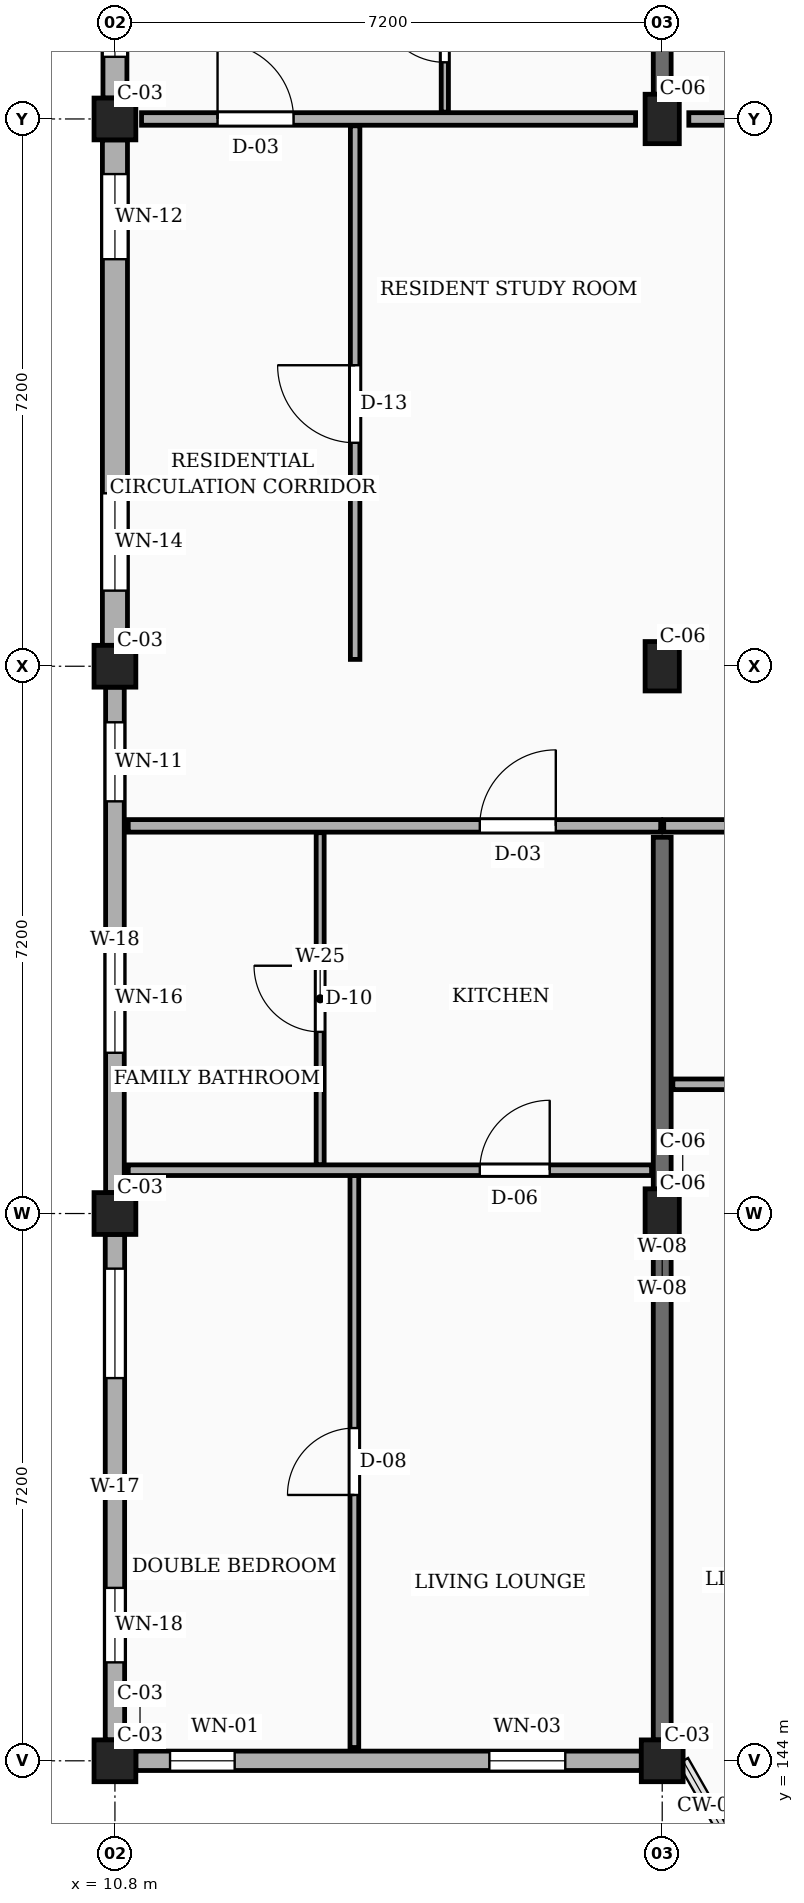
"""IFC4 building model, lengths in metres.
Left out: names, types, materials, properties, quantities, classifications, styles, units other than length and angle.
Written with IfcOpenShell. Run it as: python <this file> out.ifc"""

import sys

from ifc_helpers import new_model, si_unit, direction, frame, frame_2d, origin, origin_2d, place, context, subcontext, project, spatial, rectangle, extrude, element, fill, save


model = new_model("IFC4")
c1 = context("Model", 3, precision=1e-05, world=origin(), true_north=direction((0.0, 1.0)))
c2 = subcontext(c1, "Body", "Model", "MODEL_VIEW")
j1 = project(units=[si_unit("LENGTHUNIT", "METRE"), si_unit("PLANEANGLEUNIT", "RADIAN")], contexts=[c1])
p1 = place(None, origin())
s1 = spatial("IfcSite", under=j1, at=p1, CompositionType="ELEMENT")
p2 = place(p1, origin())
s2 = spatial("IfcBuilding", under=s1, at=p2, CompositionType="ELEMENT")
p3 = place(p2, frame((0.0, 0.0, 17.1)))
s3 = spatial("IfcBuildingStorey", under=s2, at=p3, CompositionType="ELEMENT", Elevation=17.1)
for number, where, z_axis, x_axis in (
    (1, (10.8, 144.0, 0.0), (0.0, 0.0, 1.0), (1.0, 0.0, 0.0)),
    (2, (10.8, 151.2, 0.0), (0.0, 0.0, 1.0), (1.0, 0.0, 0.0)),
    (3, (10.8, 158.4, 0.0), (0.0, 0.0, 1.0), (1.0, 0.0, 0.0)),
    (4, (10.8, 165.6, 0.0), (0.0, 0.0, 1.0), (1.0, 0.0, 0.0)),
    (5, (18.0, 144.0, 0.0), (0.0, 0.0, 1.0), (1.0, 0.0, 0.0)),
):
    element("IfcColumn", number, at=place(p3, frame(where, z_axis=z_axis, x_axis=x_axis)), inside=s3, PredefinedType="COLUMN", context=c2, shape_type="SweptSolid", body=[
        extrude(rectangle(XDim=0.55, YDim=0.55, at=origin_2d()), origin(), (0.0, 0.0, 1.0), 3.15),
    ])
for number, where, z_axis, x_axis in (
    (6, (18.0, 151.2, 0.0), (0.0, 0.0, 1.0), (1.0, 0.0, 0.0)),
    (7, (18.0, 158.4, 0.0), (0.0, 0.0, 1.0), (1.0, 0.0, 0.0)),
    (8, (18.0, 165.6, 0.0), (0.0, 0.0, 1.0), (1.0, 0.0, 0.0)),
):
    element("IfcColumn", number, at=place(p3, frame(where, z_axis=z_axis, x_axis=x_axis)), inside=s3, PredefinedType="COLUMN", context=c2, shape_type="SweptSolid", body=[
        extrude(rectangle(XDim=0.45, YDim=0.65, at=origin_2d()), origin(), (0.0, 0.0, 1.0), 3.15),
    ])
p4 = place(p3, frame((18.0, 144.275, 0.0), z_axis=(0.0, 0.0, 1.0), x_axis=(0.0, 1.0, 0.0)))
e9 = element("IfcWall", 9, at=p4, inside=s3, PredefinedType="SOLIDWALL", context=c2, shape_type="SweptSolid", body=[
    extrude(rectangle(XDim=11.875, YDim=0.235, at=frame_2d((5.938, 0.0))), origin(), (0.0, 0.0, 1.0), 2.185),
])
p5 = place(p3, frame((18.0, 165.925, 0.0), z_axis=(0.0, 0.0, 1.0), x_axis=(0.0, 1.0, 0.0)))
e10 = element("IfcWall", 10, at=p5, inside=s3, PredefinedType="SOLIDWALL", context=c2, shape_type="SweptSolid", body=[
    extrude(rectangle(XDim=6.6, YDim=0.235, at=frame_2d((3.3, 0.0))), origin(), (0.0, 0.0, 1.0), 2.185),
])
p6 = place(p3, frame((11.075, 144.0, 0.0), z_axis=(0.0, 0.0, 1.0), x_axis=(1.0, 0.0, 0.0)))
e11 = element("IfcWall", 11, at=p6, inside=s3, PredefinedType="SOLIDWALL", context=c2, shape_type="SweptSolid", body=[
    extrude(rectangle(XDim=6.65, YDim=0.255, at=frame_2d((3.325, 0.0))), origin(), (0.0, 0.0, 1.0), 2.455),
])
p7 = place(p6, frame((0.45, 0.0, 0.78)))
e12 = element("IfcOpeningElement", 12, at=p7, cuts=e11, PredefinedType="OPENING", context=c2, shape_type="SweptSolid", body=[
    extrude(rectangle(XDim=0.85, YDim=1.15, at=frame_2d((0.425, 0.575))), frame((0.0, 0.137, 0.0), z_axis=(0.0, -1.0, 0.0), x_axis=(1.0, 0.0, 0.0)), (0.0, 0.0, 1.0), 0.275),
])
p8 = place(p6, frame((4.65, 0.0, 0.78)))
e13 = element("IfcOpeningElement", 13, at=p8, cuts=e11, PredefinedType="OPENING", context=c2, shape_type="SweptSolid", body=[
    extrude(rectangle(XDim=1.0, YDim=1.15, at=frame_2d((0.5, 0.575))), frame((0.0, 0.137, 0.0), z_axis=(0.0, -1.0, 0.0), x_axis=(1.0, 0.0, 0.0)), (0.0, 0.0, 1.0), 0.275),
])
p9 = place(p3, frame((10.8, 172.525, 0.0), z_axis=(0.0, 0.0, 1.0), x_axis=(0.0, -1.0, 0.0)))
e14 = element("IfcWall", 14, at=p9, inside=s3, PredefinedType="SOLIDWALL", context=c2, shape_type="SweptSolid", body=[
    extrude(rectangle(XDim=6.65, YDim=0.315, at=frame_2d((3.325, 0.0))), origin(), (0.0, 0.0, 1.0), 2.455),
])
p10 = place(p9, frame((1.883, 0.0, 0.78)))
e15 = element("IfcOpeningElement", 15, at=p10, cuts=e14, PredefinedType="OPENING", context=c2, shape_type="SweptSolid", body=[
    extrude(rectangle(XDim=0.96, YDim=1.26, at=frame_2d((0.48, 0.63))), frame((0.0, 0.167, 0.0), z_axis=(0.0, -1.0, 0.0), x_axis=(1.0, 0.0, 0.0)), (0.0, 0.0, 1.0), 0.335),
])
p11 = place(p9, frame((4.988, 0.0, 0.78)))
e16 = element("IfcOpeningElement", 16, at=p11, cuts=e14, PredefinedType="OPENING", context=c2, shape_type="SweptSolid", body=[
    extrude(rectangle(XDim=1.12, YDim=1.26, at=frame_2d((0.56, 0.63))), frame((0.0, 0.167, 0.0), z_axis=(0.0, -1.0, 0.0), x_axis=(1.0, 0.0, 0.0)), (0.0, 0.0, 1.0), 0.335),
])
p12 = place(p3, frame((10.8, 165.325, 0.0), z_axis=(0.0, 0.0, 1.0), x_axis=(0.0, -1.0, 0.0)))
e17 = element("IfcWall", 17, at=p12, inside=s3, PredefinedType="SOLIDWALL", context=c2, shape_type="SweptSolid", body=[
    extrude(rectangle(XDim=6.65, YDim=0.33, at=frame_2d((3.325, 0.0))), origin(), (0.0, 0.0, 1.0), 2.455),
])
p13 = place(p12, frame((0.45, 0.0, 0.78)))
e18 = element("IfcOpeningElement", 18, at=p13, cuts=e17, PredefinedType="OPENING", context=c2, shape_type="SweptSolid", body=[
    extrude(rectangle(XDim=1.12, YDim=1.26, at=frame_2d((0.56, 0.63))), frame((0.0, 0.175, 0.0), z_axis=(0.0, -1.0, 0.0), x_axis=(1.0, 0.0, 0.0)), (0.0, 0.0, 1.0), 0.35),
])
p14 = place(p12, frame((4.65, 0.0, 0.78)))
e19 = element("IfcOpeningElement", 19, at=p14, cuts=e17, PredefinedType="OPENING", context=c2, shape_type="SweptSolid", body=[
    extrude(rectangle(XDim=1.28, YDim=1.26, at=frame_2d((0.64, 0.63))), frame((0.0, 0.175, 0.0), z_axis=(0.0, -1.0, 0.0), x_axis=(1.0, 0.0, 0.0)), (0.0, 0.0, 1.0), 0.35),
])
p15 = place(p3, frame((10.8, 158.125, 0.0), z_axis=(0.0, 0.0, 1.0), x_axis=(0.0, -1.0, 0.0)))
e20 = element("IfcWall", 20, at=p15, inside=s3, PredefinedType="SOLIDWALL", context=c2, shape_type="SweptSolid", body=[
    extrude(rectangle(XDim=6.65, YDim=0.245, at=frame_2d((3.325, 0.0))), origin(), (0.0, 0.0, 1.0), 2.455),
])
p16 = place(p15, frame((0.462, 0.0, 0.78)))
e21 = element("IfcOpeningElement", 21, at=p16, cuts=e20, PredefinedType="OPENING", context=c2, shape_type="SweptSolid", body=[
    extrude(rectangle(XDim=1.04, YDim=1.26, at=frame_2d((0.52, 0.63))), frame((0.0, 0.133, 0.0), z_axis=(0.0, -1.0, 0.0), x_axis=(1.0, 0.0, 0.0)), (0.0, 0.0, 1.0), 0.265),
])
p17 = place(p15, frame((3.37, 0.0, 0.78)))
e22 = element("IfcOpeningElement", 22, at=p17, cuts=e20, PredefinedType="OPENING", context=c2, shape_type="SweptSolid", body=[
    extrude(rectangle(XDim=1.44, YDim=1.26, at=frame_2d((0.72, 0.63))), frame((0.0, 0.133, 0.0), z_axis=(0.0, -1.0, 0.0), x_axis=(1.0, 0.0, 0.0)), (0.0, 0.0, 1.0), 0.265),
])
p18 = place(p3, frame((10.8, 150.925, 0.0), z_axis=(0.0, 0.0, 1.0), x_axis=(0.0, -1.0, 0.0)))
e23 = element("IfcWall", 23, at=p18, inside=s3, PredefinedType="SOLIDWALL", context=c2, shape_type="SweptSolid", body=[
    extrude(rectangle(XDim=6.65, YDim=0.255, at=frame_2d((3.325, 0.0))), origin(), (0.0, 0.0, 1.0), 2.455),
])
p19 = place(p18, frame((0.45, 0.0, 0.78)))
e24 = element("IfcOpeningElement", 24, at=p19, cuts=e23, PredefinedType="OPENING", context=c2, shape_type="SweptSolid", body=[
    extrude(rectangle(XDim=1.44, YDim=1.26, at=frame_2d((0.72, 0.63))), frame((0.0, 0.137, 0.0), z_axis=(0.0, -1.0, 0.0), x_axis=(1.0, 0.0, 0.0)), (0.0, 0.0, 1.0), 0.275),
])
p20 = place(p18, frame((4.65, 0.0, 0.78)))
e25 = element("IfcOpeningElement", 25, at=p20, cuts=e23, PredefinedType="OPENING", context=c2, shape_type="SweptSolid", body=[
    extrude(rectangle(XDim=0.98, YDim=1.36, at=frame_2d((0.49, 0.68))), frame((0.0, 0.137, 0.0), z_axis=(0.0, -1.0, 0.0), x_axis=(1.0, 0.0, 0.0)), (0.0, 0.0, 1.0), 0.275),
])
p21 = place(p3, frame((10.975, 156.3, 0.0), z_axis=(0.0, 0.0, 1.0), x_axis=(1.0, 0.0, 0.0)))
e26 = element("IfcWall", 26, at=p21, inside=s3, PredefinedType="PARTITIONING", context=c2, shape_type="SweptSolid", body=[
    extrude(rectangle(XDim=7.005, YDim=0.165, at=frame_2d((3.502, 0.0))), origin(), (0.0, 0.0, 1.0), 2.32),
])
p22 = place(p21, frame((4.625, 0.0, 0.0)))
e27 = element("IfcOpeningElement", 27, at=p22, cuts=e26, PredefinedType="OPENING", context=c2, shape_type="SweptSolid", body=[
    extrude(rectangle(XDim=1.0, YDim=2.15, at=frame_2d((0.5, 1.075))), frame((0.0, 0.093, 0.0), z_axis=(0.0, -1.0, 0.0), x_axis=(1.0, 0.0, 0.0)), (0.0, 0.0, 1.0), 0.185),
])
p23 = place(p3, frame((18.02, 156.3, 0.0), z_axis=(0.0, 0.0, 1.0), x_axis=(1.0, 0.0, 0.0)))
e28 = element("IfcWall", 28, at=p23, inside=s3, PredefinedType="PARTITIONING", context=c2, shape_type="SweptSolid", body=[
    extrude(rectangle(XDim=7.16, YDim=0.165, at=frame_2d((3.58, 0.0))), origin(), (0.0, 0.0, 1.0), 2.32),
])
p24 = place(p23, frame((1.33, 0.0, 0.0)))
e29 = element("IfcOpeningElement", 29, at=p24, cuts=e28, PredefinedType="OPENING", context=c2, shape_type="SweptSolid", body=[
    extrude(rectangle(XDim=0.94, YDim=2.12, at=frame_2d((0.47, 1.06))), frame((0.0, 0.093, 0.0), z_axis=(0.0, -1.0, 0.0), x_axis=(1.0, 0.0, 0.0)), (0.0, 0.0, 1.0), 0.185),
])
p25 = place(p3, frame((11.15, 165.6, 0.0), z_axis=(0.0, 0.0, 1.0), x_axis=(1.0, 0.0, 0.0)))
e30 = element("IfcWall", 30, at=p25, inside=s3, PredefinedType="PARTITIONING", context=c2, shape_type="SweptSolid", body=[
    extrude(rectangle(XDim=6.5, YDim=0.165, at=frame_2d((3.25, 0.0))), origin(), (0.0, 0.0, 1.0), 2.235),
])
p26 = place(p25, frame((1.0, 0.0, 0.0)))
e31 = element("IfcOpeningElement", 31, at=p26, cuts=e30, PredefinedType="OPENING", context=c2, shape_type="SweptSolid", body=[
    extrude(rectangle(XDim=1.0, YDim=2.15, at=frame_2d((0.5, 1.075))), frame((0.0, 0.093, 0.0), z_axis=(0.0, -1.0, 0.0), x_axis=(1.0, 0.0, 0.0)), (0.0, 0.0, 1.0), 0.185),
])
p27 = place(p3, frame((18.35, 165.6, 0.0), z_axis=(0.0, 0.0, 1.0), x_axis=(1.0, 0.0, 0.0)))
e32 = element("IfcWall", 32, at=p27, inside=s3, PredefinedType="PARTITIONING", context=c2, shape_type="SweptSolid", body=[
    extrude(rectangle(XDim=6.5, YDim=0.165, at=frame_2d((3.25, 0.0))), origin(), (0.0, 0.0, 1.0), 2.235),
])
p28 = place(p27, frame((1.0, 0.0, 0.0)))
e33 = element("IfcOpeningElement", 33, at=p28, cuts=e32, PredefinedType="OPENING", context=c2, shape_type="SweptSolid", body=[
    extrude(rectangle(XDim=0.94, YDim=2.12, at=frame_2d((0.47, 1.06))), frame((0.0, 0.093, 0.0), z_axis=(0.0, -1.0, 0.0), x_axis=(1.0, 0.0, 0.0)), (0.0, 0.0, 1.0), 0.185),
])
p29 = place(p3, frame((13.96, 158.49, 0.0), z_axis=(0.0, 0.0, 1.0), x_axis=(0.0, 1.0, 0.0)))
e34 = element("IfcWall", 34, at=p29, inside=s3, PredefinedType="PARTITIONING", context=c2, shape_type="SweptSolid", body=[
    extrude(rectangle(XDim=7.02, YDim=0.125, at=frame_2d((3.51, 0.0))), origin(), (0.0, 0.0, 1.0), 2.32),
])
p30 = place(p29, frame((2.85, 0.0, 0.0)))
e35 = element("IfcOpeningElement", 35, at=p30, cuts=e34, PredefinedType="OPENING", context=c2, shape_type="SweptSolid", body=[
    extrude(rectangle(XDim=1.02, YDim=2.15, at=frame_2d((0.51, 1.075))), frame((0.0, 0.073, 0.0), z_axis=(0.0, -1.0, 0.0), x_axis=(1.0, 0.0, 0.0)), (0.0, 0.0, 1.0), 0.145),
])
p31 = place(p3, frame((13.95, 144.175, 0.0), z_axis=(0.0, 0.0, 1.0), x_axis=(0.0, 1.0, 0.0)))
e36 = element("IfcWall", 36, at=p31, inside=s3, PredefinedType="PARTITIONING", context=c2, shape_type="SweptSolid", body=[
    extrude(rectangle(XDim=7.525, YDim=0.115, at=frame_2d((3.762, 0.0))), origin(), (0.0, 0.0, 1.0), 2.32),
])
p32 = place(p31, frame((3.323, 0.0, 0.0)))
e37 = element("IfcOpeningElement", 37, at=p32, cuts=e36, PredefinedType="OPENING", context=c2, shape_type="SweptSolid", body=[
    extrude(rectangle(XDim=0.88, YDim=2.08, at=frame_2d((0.44, 1.04))), frame((0.0, 0.067, 0.0), z_axis=(0.0, -1.0, 0.0), x_axis=(1.0, 0.0, 0.0)), (0.0, 0.0, 1.0), 0.135),
])
p33 = place(p3, frame((13.5, 151.84, 0.0), z_axis=(0.0, 0.0, 1.0), x_axis=(0.0, 1.0, 0.0)))
e38 = element("IfcWall", 38, at=p33, inside=s3, PredefinedType="PARTITIONING", context=c2, shape_type="SweptSolid", body=[
    extrude(rectangle(XDim=4.37, YDim=0.105, at=frame_2d((2.185, 0.0))), origin(), (0.0, 0.0, 1.0), 2.32),
])
p34 = place(p33, frame((1.75, 0.0, 0.0)))
e39 = element("IfcOpeningElement", 39, at=p34, cuts=e38, PredefinedType="OPENING", context=c2, shape_type="SweptSolid", body=[
    extrude(rectangle(XDim=0.87, YDim=2.05, at=frame_2d((0.435, 1.025))), frame((0.0, 0.062, 0.0), z_axis=(0.0, -1.0, 0.0), x_axis=(1.0, 0.0, 0.0)), (0.0, 0.0, 1.0), 0.125),
])
p35 = place(p3, frame((10.975, 151.77, 0.0), z_axis=(0.0, 0.0, 1.0), x_axis=(1.0, 0.0, 0.0)))
e40 = element("IfcWall", 40, at=p35, inside=s3, PredefinedType="PARTITIONING", context=c2, shape_type="SweptSolid", body=[
    extrude(rectangle(XDim=6.885, YDim=0.14, at=frame_2d((3.442, 0.0))), origin(), (0.0, 0.0, 1.0), 2.32),
])
p36 = place(p35, frame((4.625, 0.0, 0.0)))
e41 = element("IfcOpeningElement", 41, at=p36, cuts=e40, PredefinedType="OPENING", context=c2, shape_type="SweptSolid", body=[
    extrude(rectangle(XDim=0.92, YDim=2.1, at=frame_2d((0.46, 1.05))), frame((0.0, 0.08, 0.0), z_axis=(0.0, -1.0, 0.0), x_axis=(1.0, 0.0, 0.0)), (0.0, 0.0, 1.0), 0.16),
])
p37 = place(p3, frame((15.14, 165.69, 0.0), z_axis=(0.0, 0.0, 1.0), x_axis=(0.0, 1.0, 0.0)))
e42 = element("IfcWall", 42, at=p37, inside=s3, PredefinedType="PARTITIONING", context=c2, shape_type="SweptSolid", body=[
    extrude(rectangle(XDim=2.18, YDim=0.095, at=frame_2d((1.09, 0.0))), origin(), (0.0, 0.0, 1.0), 2.32),
])
p38 = place(p37, frame((0.655, 0.0, 0.0)))
e43 = element("IfcOpeningElement", 43, at=p38, cuts=e42, PredefinedType="OPENING", context=c2, shape_type="SweptSolid", body=[
    extrude(rectangle(XDim=0.87, YDim=2.05, at=frame_2d((0.435, 1.025))), frame((0.0, 0.058, 0.0), z_axis=(0.0, -1.0, 0.0), x_axis=(1.0, 0.0, 0.0)), (0.0, 0.0, 1.0), 0.115),
])
p39 = place(p3, frame((18.14, 152.9, 0.0), z_axis=(0.0, 0.0, 1.0), x_axis=(1.0, 0.0, 0.0)))
e44 = element("IfcWall", 44, at=p39, inside=s3, PredefinedType="PARTITIONING", context=c2, shape_type="SweptSolid", body=[
    extrude(rectangle(XDim=6.92, YDim=0.14, at=frame_2d((3.46, 0.0))), origin(), (0.0, 0.0, 1.0), 2.32),
])
p40 = place(p39, frame((1.31, 0.0, 0.0)))
e45 = element("IfcOpeningElement", 45, at=p40, cuts=e44, PredefinedType="OPENING", context=c2, shape_type="SweptSolid", body=[
    extrude(rectangle(XDim=0.95, YDim=2.1, at=frame_2d((0.475, 1.05))), frame((0.0, 0.08, 0.0), z_axis=(0.0, -1.0, 0.0), x_axis=(1.0, 0.0, 0.0)), (0.0, 0.0, 1.0), 0.16),
])
p41 = place(p7, origin())
e46 = element("IfcWindow", 46, at=p41, inside=s3, PartitioningType="SINGLE_PANEL", PredefinedType="WINDOW", context=c2, shape_type="SweptSolid", body=[
    extrude(rectangle(XDim=0.85, YDim=1.15, at=frame_2d((0.425, 0.575))), frame((0.0, 0.03, 0.0), z_axis=(0.0, -1.0, 0.0), x_axis=(1.0, 0.0, 0.0)), (0.0, 0.0, 1.0), 0.06),
])
fill(e12, e46)
p42 = place(p8, origin())
e47 = element("IfcWindow", 47, at=p42, inside=s3, PartitioningType="SINGLE_PANEL", PredefinedType="WINDOW", context=c2, shape_type="SweptSolid", body=[
    extrude(rectangle(XDim=1.0, YDim=1.15, at=frame_2d((0.5, 0.575))), frame((0.0, 0.03, 0.0), z_axis=(0.0, -1.0, 0.0), x_axis=(1.0, 0.0, 0.0)), (0.0, 0.0, 1.0), 0.06),
])
fill(e13, e47)
p43 = place(p11, origin())
e48 = element("IfcWindow", 48, at=p43, inside=s3, PartitioningType="SINGLE_PANEL", PredefinedType="WINDOW", context=c2, shape_type="SweptSolid", body=[
    extrude(rectangle(XDim=1.12, YDim=1.26, at=frame_2d((0.56, 0.63))), frame((0.0, 0.03, 0.0), z_axis=(0.0, -1.0, 0.0), x_axis=(1.0, 0.0, 0.0)), (0.0, 0.0, 1.0), 0.06),
])
fill(e16, e48)
p44 = place(p13, origin())
e49 = element("IfcWindow", 49, at=p44, inside=s3, PartitioningType="SINGLE_PANEL", PredefinedType="WINDOW", context=c2, shape_type="SweptSolid", body=[
    extrude(rectangle(XDim=1.12, YDim=1.26, at=frame_2d((0.56, 0.63))), frame((0.0, 0.03, 0.0), z_axis=(0.0, -1.0, 0.0), x_axis=(1.0, 0.0, 0.0)), (0.0, 0.0, 1.0), 0.06),
])
fill(e18, e49)
p45 = place(p14, origin())
e50 = element("IfcWindow", 50, at=p45, inside=s3, PartitioningType="SINGLE_PANEL", PredefinedType="WINDOW", context=c2, shape_type="SweptSolid", body=[
    extrude(rectangle(XDim=1.28, YDim=1.26, at=frame_2d((0.64, 0.63))), frame((0.0, 0.03, 0.0), z_axis=(0.0, -1.0, 0.0), x_axis=(1.0, 0.0, 0.0)), (0.0, 0.0, 1.0), 0.06),
])
fill(e19, e50)
p46 = place(p16, origin())
e51 = element("IfcWindow", 51, at=p46, inside=s3, PartitioningType="SINGLE_PANEL", PredefinedType="WINDOW", context=c2, shape_type="SweptSolid", body=[
    extrude(rectangle(XDim=1.04, YDim=1.26, at=frame_2d((0.52, 0.63))), frame((0.0, 0.03, 0.0), z_axis=(0.0, -1.0, 0.0), x_axis=(1.0, 0.0, 0.0)), (0.0, 0.0, 1.0), 0.06),
])
fill(e21, e51)
p47 = place(p17, origin())
e52 = element("IfcWindow", 52, at=p47, inside=s3, PartitioningType="SINGLE_PANEL", PredefinedType="WINDOW", context=c2, shape_type="SweptSolid", body=[
    extrude(rectangle(XDim=1.44, YDim=1.26, at=frame_2d((0.72, 0.63))), frame((0.0, 0.03, 0.0), z_axis=(0.0, -1.0, 0.0), x_axis=(1.0, 0.0, 0.0)), (0.0, 0.0, 1.0), 0.06),
])
fill(e22, e52)
p48 = place(p19, origin())
e53 = element("IfcWindow", 53, at=p48, inside=s3, PartitioningType="SINGLE_PANEL", PredefinedType="WINDOW", context=c2, shape_type="SweptSolid", body=[
    extrude(rectangle(XDim=1.44, YDim=1.26, at=frame_2d((0.72, 0.63))), frame((0.0, 0.03, 0.0), z_axis=(0.0, -1.0, 0.0), x_axis=(1.0, 0.0, 0.0)), (0.0, 0.0, 1.0), 0.06),
])
fill(e24, e53)
p49 = place(p20, origin())
e54 = element("IfcWindow", 54, at=p49, inside=s3, PartitioningType="SINGLE_PANEL", PredefinedType="WINDOW", context=c2, shape_type="SweptSolid", body=[
    extrude(rectangle(XDim=0.98, YDim=1.36, at=frame_2d((0.49, 0.68))), frame((0.0, 0.03, 0.0), z_axis=(0.0, -1.0, 0.0), x_axis=(1.0, 0.0, 0.0)), (0.0, 0.0, 1.0), 0.06),
])
fill(e25, e54)
p50 = place(p22, origin())
e55 = element("IfcDoor", 55, at=p50, inside=s3, OperationType="SINGLE_SWING_RIGHT", PredefinedType="DOOR", context=c2, shape_type="SweptSolid", body=[
    extrude(rectangle(XDim=1.0, YDim=2.15, at=frame_2d((0.5, 1.075))), frame((0.0, 0.025, 0.0), z_axis=(0.0, -1.0, 0.0), x_axis=(1.0, 0.0, 0.0)), (0.0, 0.0, 1.0), 0.05),
])
fill(e27, e55)
p51 = place(p26, origin())
e56 = element("IfcDoor", 56, at=p51, inside=s3, OperationType="SINGLE_SWING_LEFT", PredefinedType="DOOR", context=c2, shape_type="SweptSolid", body=[
    extrude(rectangle(XDim=1.0, YDim=2.15, at=frame_2d((0.5, 1.075))), frame((0.0, 0.025, 0.0), z_axis=(0.0, -1.0, 0.0), x_axis=(1.0, 0.0, 0.0)), (0.0, 0.0, 1.0), 0.05),
])
fill(e31, e56)
p52 = place(p30, origin())
e57 = element("IfcDoor", 57, at=p52, inside=s3, OperationType="SINGLE_SWING_RIGHT", PredefinedType="DOOR", context=c2, shape_type="SweptSolid", body=[
    extrude(rectangle(XDim=1.02, YDim=2.15, at=frame_2d((0.51, 1.075))), frame((0.0, 0.025, 0.0), z_axis=(0.0, -1.0, 0.0), x_axis=(1.0, 0.0, 0.0)), (0.0, 0.0, 1.0), 0.05),
])
fill(e35, e57)
p53 = place(p32, origin())
e58 = element("IfcDoor", 58, at=p53, inside=s3, OperationType="SINGLE_SWING_LEFT", PredefinedType="DOOR", context=c2, shape_type="SweptSolid", body=[
    extrude(rectangle(XDim=0.88, YDim=2.08, at=frame_2d((0.44, 1.04))), frame((0.0, 0.025, 0.0), z_axis=(0.0, -1.0, 0.0), x_axis=(1.0, 0.0, 0.0)), (0.0, 0.0, 1.0), 0.05),
])
fill(e37, e58)
p54 = place(p34, origin())
e59 = element("IfcDoor", 59, at=p54, inside=s3, OperationType="SINGLE_SWING_RIGHT", PredefinedType="DOOR", context=c2, shape_type="SweptSolid", body=[
    extrude(rectangle(XDim=0.87, YDim=2.05, at=frame_2d((0.435, 1.025))), frame((0.0, 0.025, 0.0), z_axis=(0.0, -1.0, 0.0), x_axis=(1.0, 0.0, 0.0)), (0.0, 0.0, 1.0), 0.05),
])
fill(e39, e59)
p55 = place(p36, origin())
e60 = element("IfcDoor", 60, at=p55, inside=s3, OperationType="SINGLE_SWING_RIGHT", PredefinedType="DOOR", context=c2, shape_type="SweptSolid", body=[
    extrude(rectangle(XDim=0.92, YDim=2.1, at=frame_2d((0.46, 1.05))), frame((0.0, 0.025, 0.0), z_axis=(0.0, -1.0, 0.0), x_axis=(1.0, 0.0, 0.0)), (0.0, 0.0, 1.0), 0.05),
])
fill(e41, e60)
p56 = place(p38, origin())
e61 = element("IfcDoor", 61, at=p56, inside=s3, OperationType="SINGLE_SWING_RIGHT", PredefinedType="DOOR", context=c2, shape_type="SweptSolid", body=[
    extrude(rectangle(XDim=0.87, YDim=2.05, at=frame_2d((0.435, 1.025))), frame((0.0, 0.025, 0.0), z_axis=(0.0, -1.0, 0.0), x_axis=(1.0, 0.0, 0.0)), (0.0, 0.0, 1.0), 0.05),
])
fill(e43, e61)
save(model, sys.argv[1])
